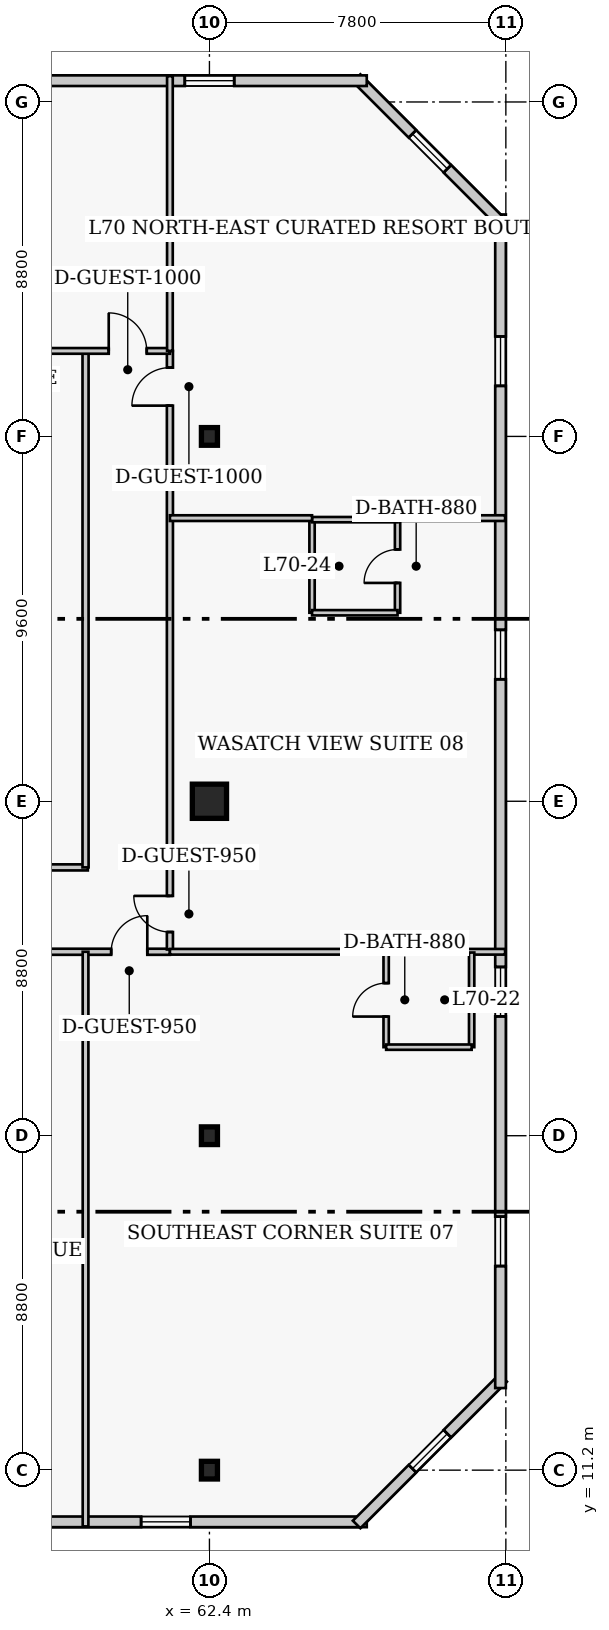
"""IFC4 building model, lengths in metres.
Left out: names, types, materials, properties, quantities, classifications, styles, units other than length and angle.
Written with IfcOpenShell. Run it as: python <this file> out.ifc"""

import sys

from ifc_helpers import new_model, si_unit, direction, frame, frame_2d, origin, origin_2d, place, context, subcontext, project, spatial, rectangle, i_section, extrude, element, fill, save


model = new_model("IFC4")
c1 = context("Model", 3, precision=1e-05, world=origin(), true_north=direction((0.0, 1.0)))
c2 = subcontext(c1, "Body", "Model", "MODEL_VIEW")
j1 = project(units=[si_unit("LENGTHUNIT", "METRE"), si_unit("PLANEANGLEUNIT", "RADIAN")], contexts=[c1])
p1 = place(None, origin())
s1 = spatial("IfcSite", under=j1, at=p1, CompositionType="ELEMENT")
p2 = place(p1, origin())
s2 = spatial("IfcBuilding", under=s1, at=p2, CompositionType="ELEMENT")
p3 = place(p2, frame((0.0, 0.0, 281.4)))
s3 = spatial("IfcBuildingStorey", under=s2, at=p3, CompositionType="ELEMENT", Elevation=281.4)
for number, where, z_axis, x_axis in (
    (1, (62.4, 11.2, 0.0), (0.0, 0.0, 1.0), (1.0, 0.0, 0.0)),
    (2, (62.4, 20.0, 0.0), (0.0, 0.0, 1.0), (1.0, 0.0, 0.0)),
):
    element("IfcColumn", number, at=place(p3, frame(where, z_axis=z_axis, x_axis=x_axis)), inside=s3, PredefinedType="COLUMN", context=c2, shape_type="SweptSolid", body=[
        extrude(i_section(OverallWidth=0.422, OverallDepth=0.465, WebThickness=0.045, FlangeThickness=0.073, FilletRadius=0.017, at=origin_2d()), origin(), (0.0, 0.0, 1.0), 4.0),
    ])
p4 = place(p3, frame((62.4, 28.8, 0.0), z_axis=(0.0, 0.0, 1.0), x_axis=(1.0, 0.0, 0.0)))
e3 = element("IfcColumn", 3, at=p4, inside=s3, PredefinedType="COLUMN", context=c2, shape_type="SweptSolid", body=[
    extrude(rectangle(XDim=0.9, YDim=0.9, at=origin_2d()), origin(), (0.0, 0.0, 1.0), 4.0),
])
p5 = place(p3, frame((62.4, 38.4, 0.0), z_axis=(0.0, 0.0, 1.0), x_axis=(1.0, 0.0, 0.0)))
e4 = element("IfcColumn", 4, at=p5, inside=s3, PredefinedType="COLUMN", context=c2, shape_type="SweptSolid", body=[
    extrude(i_section(OverallWidth=0.422, OverallDepth=0.465, WebThickness=0.045, FlangeThickness=0.073, FilletRadius=0.017, at=origin_2d()), origin(), (0.0, 0.0, 1.0), 4.0),
])
p6 = place(p3, frame((41.71, 9.84, 0.0), z_axis=(0.0, 0.0, 1.0), x_axis=(1.0, 0.0, 0.0)))
e5 = element("IfcWall", 5, at=p6, inside=s3, PredefinedType="SOLIDWALL", context=c2, shape_type="SweptSolid", body=[
    extrude(rectangle(XDim=24.83, YDim=0.28, at=frame_2d((12.415, 0.0))), origin(), (0.0, 0.0, 1.0), 3.76),
])
p7 = place(p6, frame((2.838, 0.0, 0.85)))
e6 = element("IfcOpeningElement", 6, at=p7, cuts=e5, PredefinedType="OPENING", context=c2, shape_type="SweptSolid", body=[
    extrude(rectangle(XDim=1.3, YDim=1.7, at=frame_2d((0.65, 0.85))), frame((0.0, 0.15, 0.0), z_axis=(0.0, -1.0, 0.0), x_axis=(1.0, 0.0, 0.0)), (0.0, 0.0, 1.0), 0.3),
])
p8 = place(p6, frame((11.115, 0.0, 0.85)))
e7 = element("IfcOpeningElement", 7, at=p8, cuts=e5, PredefinedType="OPENING", context=c2, shape_type="SweptSolid", body=[
    extrude(rectangle(XDim=1.3, YDim=1.7, at=frame_2d((0.65, 0.85))), frame((0.0, 0.15, 0.0), z_axis=(0.0, -1.0, 0.0), x_axis=(1.0, 0.0, 0.0)), (0.0, 0.0, 1.0), 0.3),
])
p9 = place(p6, frame((18.892, 0.0, 0.85)))
e8 = element("IfcOpeningElement", 8, at=p9, cuts=e5, PredefinedType="OPENING", context=c2, shape_type="SweptSolid", body=[
    extrude(rectangle(XDim=1.3, YDim=1.7, at=frame_2d((0.65, 0.85))), frame((0.0, 0.15, 0.0), z_axis=(0.0, -1.0, 0.0), x_axis=(1.0, 0.0, 0.0)), (0.0, 0.0, 1.0), 0.3),
])
p10 = place(p3, frame((66.273, 9.771, 0.0), z_axis=(0.0, 0.0, 1.0), x_axis=(0.707129162587, 0.707084399077, 0.0)))
e9 = element("IfcWall", 9, at=p10, inside=s3, PredefinedType="SOLIDWALL", context=c2, shape_type="SweptSolid", body=[
    extrude(rectangle(XDim=5.454, YDim=0.28, at=frame_2d((2.727, 0.0))), origin(), (0.0, 0.0, 1.0), 3.76),
])
p11 = place(p10, frame((2.077, 0.0, 0.85)))
e10 = element("IfcOpeningElement", 10, at=p11, cuts=e9, PredefinedType="OPENING", context=c2, shape_type="SweptSolid", body=[
    extrude(rectangle(XDim=1.3, YDim=1.7, at=frame_2d((0.65, 0.85))), frame((0.0, 0.15, 0.0), z_axis=(0.0, -1.0, 0.0), x_axis=(1.0, 0.0, 0.0)), (0.0, 0.0, 1.0), 0.3),
])
p12 = place(p3, frame((70.06, 13.36, 0.0), z_axis=(0.0, 0.0, 1.0), x_axis=(0.0, 1.0, 0.0)))
e11 = element("IfcWall", 11, at=p12, inside=s3, PredefinedType="SOLIDWALL", context=c2, shape_type="SweptSolid", body=[
    extrude(rectangle(XDim=30.88, YDim=0.28, at=frame_2d((15.44, 0.0))), origin(), (0.0, 0.0, 1.0), 3.76),
])
p13 = place(p12, frame((3.21, 0.0, 0.85)))
e12 = element("IfcOpeningElement", 12, at=p13, cuts=e11, PredefinedType="OPENING", context=c2, shape_type="SweptSolid", body=[
    extrude(rectangle(XDim=1.3, YDim=1.7, at=frame_2d((0.65, 0.85))), frame((0.0, 0.15, 0.0), z_axis=(0.0, -1.0, 0.0), x_axis=(1.0, 0.0, 0.0)), (0.0, 0.0, 1.0), 0.3),
])
p14 = place(p12, frame((9.78, 0.0, 0.85)))
e13 = element("IfcOpeningElement", 13, at=p14, cuts=e11, PredefinedType="OPENING", context=c2, shape_type="SweptSolid", body=[
    extrude(rectangle(XDim=1.3, YDim=1.7, at=frame_2d((0.65, 0.85))), frame((0.0, 0.15, 0.0), z_axis=(0.0, -1.0, 0.0), x_axis=(1.0, 0.0, 0.0)), (0.0, 0.0, 1.0), 0.3),
])
p15 = place(p12, frame((18.65, 0.0, 0.85)))
e14 = element("IfcOpeningElement", 14, at=p15, cuts=e11, PredefinedType="OPENING", context=c2, shape_type="SweptSolid", body=[
    extrude(rectangle(XDim=1.3, YDim=1.7, at=frame_2d((0.65, 0.85))), frame((0.0, 0.15, 0.0), z_axis=(0.0, -1.0, 0.0), x_axis=(1.0, 0.0, 0.0)), (0.0, 0.0, 1.0), 0.3),
])
p16 = place(p12, frame((26.37, 0.0, 0.85)))
e15 = element("IfcOpeningElement", 15, at=p16, cuts=e11, PredefinedType="OPENING", context=c2, shape_type="SweptSolid", body=[
    extrude(rectangle(XDim=1.3, YDim=1.7, at=frame_2d((0.65, 0.85))), frame((0.0, 0.15, 0.0), z_axis=(0.0, -1.0, 0.0), x_axis=(1.0, 0.0, 0.0)), (0.0, 0.0, 1.0), 0.3),
])
p17 = place(p3, frame((70.129, 43.973, 0.0), z_axis=(0.0, 0.0, 1.0), x_axis=(-0.707106781187, 0.707106781187, 0.0)))
e16 = element("IfcWall", 16, at=p17, inside=s3, PredefinedType="SOLIDWALL", context=c2, shape_type="SweptSolid", body=[
    extrude(rectangle(XDim=5.454, YDim=0.28, at=frame_2d((2.727, 0.0))), origin(), (0.0, 0.0, 1.0), 3.76),
])
p18 = place(p17, frame((2.077, 0.0, 0.85)))
e17 = element("IfcOpeningElement", 17, at=p18, cuts=e16, PredefinedType="OPENING", context=c2, shape_type="SweptSolid", body=[
    extrude(rectangle(XDim=1.3, YDim=1.7, at=frame_2d((0.65, 0.85))), frame((0.0, 0.15, 0.0), z_axis=(0.0, -1.0, 0.0), x_axis=(1.0, 0.0, 0.0)), (0.0, 0.0, 1.0), 0.3),
])
p19 = place(p3, frame((66.54, 47.76, 0.0), z_axis=(0.0, 0.0, 1.0), x_axis=(-1.0, 0.0, 0.0)))
e18 = element("IfcWall", 18, at=p19, inside=s3, PredefinedType="SOLIDWALL", context=c2, shape_type="SweptSolid", body=[
    extrude(rectangle(XDim=24.83, YDim=0.28, at=frame_2d((12.415, 0.0))), origin(), (0.0, 0.0, 1.0), 3.76),
])
p20 = place(p19, frame((3.488, 0.0, 0.85)))
e19 = element("IfcOpeningElement", 19, at=p20, cuts=e18, PredefinedType="OPENING", context=c2, shape_type="SweptSolid", body=[
    extrude(rectangle(XDim=1.3, YDim=1.7, at=frame_2d((0.65, 0.85))), frame((0.0, 0.15, 0.0), z_axis=(0.0, -1.0, 0.0), x_axis=(1.0, 0.0, 0.0)), (0.0, 0.0, 1.0), 0.3),
])
p21 = place(p19, frame((12.915, 0.0, 0.85)))
e20 = element("IfcOpeningElement", 20, at=p21, cuts=e18, PredefinedType="OPENING", context=c2, shape_type="SweptSolid", body=[
    extrude(rectangle(XDim=1.3, YDim=1.7, at=frame_2d((0.65, 0.85))), frame((0.0, 0.15, 0.0), z_axis=(0.0, -1.0, 0.0), x_axis=(1.0, 0.0, 0.0)), (0.0, 0.0, 1.0), 0.3),
])
p22 = place(p19, frame((20.692, 0.0, 0.85)))
e21 = element("IfcOpeningElement", 21, at=p22, cuts=e18, PredefinedType="OPENING", context=c2, shape_type="SweptSolid", body=[
    extrude(rectangle(XDim=1.3, YDim=1.7, at=frame_2d((0.65, 0.85))), frame((0.0, 0.15, 0.0), z_axis=(0.0, -1.0, 0.0), x_axis=(1.0, 0.0, 0.0)), (0.0, 0.0, 1.0), 0.3),
])
p23 = place(p3, frame((35.85, 27.06, 0.0), z_axis=(0.0, 0.0, 1.0), x_axis=(1.0, 0.0, 0.0)))
e22 = element("IfcWall", 22, at=p23, inside=s3, PredefinedType="PARTITIONING", context=c2, shape_type="SweptSolid", body=[
    extrude(rectangle(XDim=23.35, YDim=0.16, at=frame_2d((11.675, 0.0))), origin(), (0.0, 0.0, 1.0), 3.76),
])
p24 = place(p23, frame((6.15, 0.0, 0.0)))
e23 = element("IfcOpeningElement", 23, at=p24, cuts=e22, PredefinedType="OPENING", context=c2, shape_type="SweptSolid", body=[
    extrude(rectangle(XDim=1.0, YDim=2.15, at=frame_2d((0.5, 1.075))), frame((0.0, 0.09, 0.0), z_axis=(0.0, -1.0, 0.0), x_axis=(1.0, 0.0, 0.0)), (0.0, 0.0, 1.0), 0.18),
])
p25 = place(p23, frame((13.65, 0.0, 0.0)))
e24 = element("IfcOpeningElement", 24, at=p25, cuts=e22, PredefinedType="OPENING", context=c2, shape_type="SweptSolid", body=[
    extrude(rectangle(XDim=1.0, YDim=2.15, at=frame_2d((0.5, 1.075))), frame((0.0, 0.09, 0.0), z_axis=(0.0, -1.0, 0.0), x_axis=(1.0, 0.0, 0.0)), (0.0, 0.0, 1.0), 0.18),
])
p26 = place(p3, frame((35.8, 24.84, 0.0), z_axis=(0.0, 0.0, 1.0), x_axis=(1.0, 0.0, 0.0)))
e25 = element("IfcWall", 25, at=p26, inside=s3, PredefinedType="PARTITIONING", context=c2, shape_type="SweptSolid", body=[
    extrude(rectangle(XDim=25.56, YDim=0.16, at=frame_2d((12.78, 0.0))), origin(), (0.0, 0.0, 1.0), 3.76),
])
p27 = place(p26, frame((4.185, 0.0, 0.0)))
e26 = element("IfcOpeningElement", 26, at=p27, cuts=e25, PredefinedType="OPENING", context=c2, shape_type="SweptSolid", body=[
    extrude(rectangle(XDim=0.95, YDim=2.1, at=frame_2d((0.475, 1.05))), frame((0.0, 0.09, 0.0), z_axis=(0.0, -1.0, 0.0), x_axis=(1.0, 0.0, 0.0)), (0.0, 0.0, 1.0), 0.18),
])
p28 = place(p26, frame((17.28, 0.0, 0.0)))
e27 = element("IfcOpeningElement", 27, at=p28, cuts=e25, PredefinedType="OPENING", context=c2, shape_type="SweptSolid", body=[
    extrude(rectangle(XDim=1.0, YDim=2.15, at=frame_2d((0.5, 1.075))), frame((0.0, 0.09, 0.0), z_axis=(0.0, -1.0, 0.0), x_axis=(1.0, 0.0, 0.0)), (0.0, 0.0, 1.0), 0.18),
])
p29 = place(p26, frame((24.015, 0.0, 0.0)))
e28 = element("IfcOpeningElement", 28, at=p29, cuts=e25, PredefinedType="OPENING", context=c2, shape_type="SweptSolid", body=[
    extrude(rectangle(XDim=0.95, YDim=2.1, at=frame_2d((0.475, 1.05))), frame((0.0, 0.09, 0.0), z_axis=(0.0, -1.0, 0.0), x_axis=(1.0, 0.0, 0.0)), (0.0, 0.0, 1.0), 0.18),
])
p30 = place(p3, frame((61.36, 24.9, 0.0), z_axis=(0.0, 0.0, 1.0), x_axis=(0.0, 1.0, 0.0)))
e29 = element("IfcWall", 29, at=p30, inside=s3, PredefinedType="PARTITIONING", context=c2, shape_type="SweptSolid", body=[
    extrude(rectangle(XDim=15.75, YDim=0.16, at=frame_2d((7.875, 0.0))), origin(), (0.0, 0.0, 1.0), 3.76),
])
p31 = place(p30, frame((0.46, 0.0, 0.0)))
e30 = element("IfcOpeningElement", 30, at=p31, cuts=e29, PredefinedType="OPENING", context=c2, shape_type="SweptSolid", body=[
    extrude(rectangle(XDim=0.95, YDim=2.1, at=frame_2d((0.475, 1.05))), frame((0.0, 0.09, 0.0), z_axis=(0.0, -1.0, 0.0), x_axis=(1.0, 0.0, 0.0)), (0.0, 0.0, 1.0), 0.18),
])
p32 = place(p30, frame((14.31, 0.0, 0.0)))
e31 = element("IfcOpeningElement", 31, at=p32, cuts=e29, PredefinedType="OPENING", context=c2, shape_type="SweptSolid", body=[
    extrude(rectangle(XDim=1.0, YDim=2.15, at=frame_2d((0.5, 1.075))), frame((0.0, 0.09, 0.0), z_axis=(0.0, -1.0, 0.0), x_axis=(1.0, 0.0, 0.0)), (0.0, 0.0, 1.0), 0.18),
])
p33 = place(p3, frame((59.14, 27.06, 0.0), z_axis=(0.0, 0.0, 1.0), x_axis=(0.0, 1.0, 0.0)))
e32 = element("IfcWall", 32, at=p33, inside=s3, PredefinedType="PARTITIONING", context=c2, shape_type="SweptSolid", body=[
    extrude(rectangle(XDim=13.59, YDim=0.16, at=frame_2d((6.795, 0.0))), origin(), (0.0, 0.0, 1.0), 3.76),
])
p34 = place(p3, frame((56.8, 40.65, 0.0), z_axis=(0.0, 0.0, 1.0), x_axis=(1.0, 0.0, 0.0)))
e33 = element("IfcWall", 33, at=p34, inside=s3, PredefinedType="PARTITIONING", context=c2, shape_type="SweptSolid", body=[
    extrude(rectangle(XDim=4.56, YDim=0.15, at=frame_2d((2.28, 0.0))), origin(), (0.0, 0.0, 1.0), 3.76),
])
p35 = place(p34, frame((2.95, 0.0, 0.0)))
e34 = element("IfcOpeningElement", 34, at=p35, cuts=e33, PredefinedType="OPENING", context=c2, shape_type="SweptSolid", body=[
    extrude(rectangle(XDim=1.0, YDim=2.15, at=frame_2d((0.5, 1.075))), frame((0.0, 0.085, 0.0), z_axis=(0.0, -1.0, 0.0), x_axis=(1.0, 0.0, 0.0)), (0.0, 0.0, 1.0), 0.17),
])
p36 = place(p3, frame((61.36, 40.65, 0.0), z_axis=(0.0, 0.0, 1.0), x_axis=(0.0, 1.0, 0.0)))
e35 = element("IfcWall", 35, at=p36, inside=s3, PredefinedType="PARTITIONING", context=c2, shape_type="SweptSolid", body=[
    extrude(rectangle(XDim=7.23, YDim=0.15, at=frame_2d((3.615, 0.0))), origin(), (0.0, 0.0, 1.0), 3.76),
])
p37 = place(p3, frame((59.14, 9.72, 0.0), z_axis=(0.0, 0.0, 1.0), x_axis=(0.0, 1.0, 0.0)))
e36 = element("IfcWall", 36, at=p37, inside=s3, PredefinedType="PARTITIONING", context=c2, shape_type="SweptSolid", body=[
    extrude(rectangle(XDim=15.12, YDim=0.15, at=frame_2d((7.56, 0.0))), origin(), (0.0, 0.0, 1.0), 3.76),
])
p38 = place(p3, frame((61.36, 24.84, 0.0), z_axis=(0.0, 0.0, 1.0), x_axis=(1.0, 0.0, 0.0)))
e37 = element("IfcWall", 37, at=p38, inside=s3, PredefinedType="PARTITIONING", context=c2, shape_type="SweptSolid", body=[
    extrude(rectangle(XDim=8.82, YDim=0.15, at=frame_2d((4.41, 0.0))), origin(), (0.0, 0.0, 1.0), 3.76),
])
p39 = place(p3, frame((67.05, 22.33, 0.0), z_axis=(0.0, 0.0, 1.0), x_axis=(0.0, 1.0, 0.0)))
e38 = element("IfcWall", 38, at=p39, inside=s3, PredefinedType="PLUMBINGWALL", context=c2, shape_type="SweptSolid", body=[
    extrude(rectangle(XDim=2.49, YDim=0.14, at=frame_2d((1.245, 0.0))), origin(), (0.0, 0.0, 1.0), 3.76),
])
p40 = place(p39, frame((0.805, 0.0, 0.0)))
e39 = element("IfcOpeningElement", 39, at=p40, cuts=e38, PredefinedType="OPENING", context=c2, shape_type="SweptSolid", body=[
    extrude(rectangle(XDim=0.88, YDim=2.05, at=frame_2d((0.44, 1.025))), frame((0.0, 0.08, 0.0), z_axis=(0.0, -1.0, 0.0), x_axis=(1.0, 0.0, 0.0)), (0.0, 0.0, 1.0), 0.16),
])
p41 = place(p3, frame((69.3, 22.33, 0.0), z_axis=(0.0, 0.0, 1.0), x_axis=(0.0, 1.0, 0.0)))
e40 = element("IfcWall", 40, at=p41, inside=s3, PredefinedType="PLUMBINGWALL", context=c2, shape_type="SweptSolid", body=[
    extrude(rectangle(XDim=2.49, YDim=0.14, at=frame_2d((1.245, 0.0))), origin(), (0.0, 0.0, 1.0), 3.76),
])
p42 = place(p3, frame((67.05, 22.33, 0.0), z_axis=(0.0, 0.0, 1.0), x_axis=(1.0, 0.0, 0.0)))
e41 = element("IfcWall", 41, at=p42, inside=s3, PredefinedType="PLUMBINGWALL", context=c2, shape_type="SweptSolid", body=[
    extrude(rectangle(XDim=2.25, YDim=0.14, at=frame_2d((1.125, 0.0))), origin(), (0.0, 0.0, 1.0), 3.76),
])
p43 = place(p3, frame((65.1, 33.76, 0.0), z_axis=(0.0, 0.0, 1.0), x_axis=(0.0, 1.0, 0.0)))
e42 = element("IfcWall", 42, at=p43, inside=s3, PredefinedType="PLUMBINGWALL", context=c2, shape_type="SweptSolid", body=[
    extrude(rectangle(XDim=2.45, YDim=0.14, at=frame_2d((1.225, 0.0))), origin(), (0.0, 0.0, 1.0), 3.76),
])
p44 = place(p3, frame((67.35, 33.76, 0.0), z_axis=(0.0, 0.0, 1.0), x_axis=(0.0, 1.0, 0.0)))
e43 = element("IfcWall", 43, at=p44, inside=s3, PredefinedType="PLUMBINGWALL", context=c2, shape_type="SweptSolid", body=[
    extrude(rectangle(XDim=2.45, YDim=0.14, at=frame_2d((1.225, 0.0))), origin(), (0.0, 0.0, 1.0), 3.76),
])
p45 = place(p44, frame((0.785, 0.0, 0.0)))
e44 = element("IfcOpeningElement", 44, at=p45, cuts=e43, PredefinedType="OPENING", context=c2, shape_type="SweptSolid", body=[
    extrude(rectangle(XDim=0.88, YDim=2.05, at=frame_2d((0.44, 1.025))), frame((0.0, 0.08, 0.0), z_axis=(0.0, -1.0, 0.0), x_axis=(1.0, 0.0, 0.0)), (0.0, 0.0, 1.0), 0.16),
])
for number, where, z_axis, x_axis in (
    (45, (65.1, 33.76, 0.0), (0.0, 0.0, 1.0), (1.0, 0.0, 0.0)),
    (46, (65.1, 36.21, 0.0), (0.0, 0.0, 1.0), (1.0, 0.0, 0.0)),
):
    element("IfcWall", number, at=place(p3, frame(where, z_axis=z_axis, x_axis=x_axis)), inside=s3, PredefinedType="PLUMBINGWALL", context=c2, shape_type="SweptSolid", body=[
        extrude(rectangle(XDim=2.25, YDim=0.14, at=frame_2d((1.125, 0.0))), origin(), (0.0, 0.0, 1.0), 3.76),
    ])
p46 = place(p3, frame((61.36, 36.25, 0.0), z_axis=(0.0, 0.0, 1.0), x_axis=(1.0, 0.0, 0.0)))
e47 = element("IfcWall", 47, at=p46, inside=s3, PredefinedType="PARTITIONING", context=c2, shape_type="SweptSolid", body=[
    extrude(rectangle(XDim=3.74, YDim=0.15, at=frame_2d((1.87, 0.0))), origin(), (0.0, 0.0, 1.0), 3.76),
])
p47 = place(p3, frame((67.35, 36.25, 0.0), z_axis=(0.0, 0.0, 1.0), x_axis=(1.0, 0.0, 0.0)))
e48 = element("IfcWall", 48, at=p47, inside=s3, PredefinedType="PARTITIONING", context=c2, shape_type="SweptSolid", body=[
    extrude(rectangle(XDim=2.83, YDim=0.15, at=frame_2d((1.415, 0.0))), origin(), (0.0, 0.0, 1.0), 3.76),
])
p48 = place(p9, origin())
e49 = element("IfcWindow", 49, at=p48, inside=s3, PartitioningType="SINGLE_PANEL", PredefinedType="WINDOW", context=c2, shape_type="SweptSolid", body=[
    extrude(rectangle(XDim=1.3, YDim=1.7, at=frame_2d((0.65, 0.85))), frame((0.0, 0.03, 0.0), z_axis=(0.0, -1.0, 0.0), x_axis=(1.0, 0.0, 0.0)), (0.0, 0.0, 1.0), 0.06),
])
fill(e8, e49)
p49 = place(p11, origin())
e50 = element("IfcWindow", 50, at=p49, inside=s3, PartitioningType="SINGLE_PANEL", PredefinedType="WINDOW", context=c2, shape_type="SweptSolid", body=[
    extrude(rectangle(XDim=1.3, YDim=1.7, at=frame_2d((0.65, 0.85))), frame((0.0, 0.03, 0.0), z_axis=(0.0, -1.0, 0.0), x_axis=(1.0, 0.0, 0.0)), (0.0, 0.0, 1.0), 0.06),
])
fill(e10, e50)
p50 = place(p13, origin())
e51 = element("IfcWindow", 51, at=p50, inside=s3, PartitioningType="SINGLE_PANEL", PredefinedType="WINDOW", context=c2, shape_type="SweptSolid", body=[
    extrude(rectangle(XDim=1.3, YDim=1.7, at=frame_2d((0.65, 0.85))), frame((0.0, 0.03, 0.0), z_axis=(0.0, -1.0, 0.0), x_axis=(1.0, 0.0, 0.0)), (0.0, 0.0, 1.0), 0.06),
])
fill(e12, e51)
p51 = place(p14, origin())
e52 = element("IfcWindow", 52, at=p51, inside=s3, PartitioningType="SINGLE_PANEL", PredefinedType="WINDOW", context=c2, shape_type="SweptSolid", body=[
    extrude(rectangle(XDim=1.3, YDim=1.7, at=frame_2d((0.65, 0.85))), frame((0.0, 0.03, 0.0), z_axis=(0.0, -1.0, 0.0), x_axis=(1.0, 0.0, 0.0)), (0.0, 0.0, 1.0), 0.06),
])
fill(e13, e52)
p52 = place(p15, origin())
e53 = element("IfcWindow", 53, at=p52, inside=s3, PartitioningType="SINGLE_PANEL", PredefinedType="WINDOW", context=c2, shape_type="SweptSolid", body=[
    extrude(rectangle(XDim=1.3, YDim=1.7, at=frame_2d((0.65, 0.85))), frame((0.0, 0.03, 0.0), z_axis=(0.0, -1.0, 0.0), x_axis=(1.0, 0.0, 0.0)), (0.0, 0.0, 1.0), 0.06),
])
fill(e14, e53)
p53 = place(p16, origin())
e54 = element("IfcWindow", 54, at=p53, inside=s3, PartitioningType="SINGLE_PANEL", PredefinedType="WINDOW", context=c2, shape_type="SweptSolid", body=[
    extrude(rectangle(XDim=1.3, YDim=1.7, at=frame_2d((0.65, 0.85))), frame((0.0, 0.03, 0.0), z_axis=(0.0, -1.0, 0.0), x_axis=(1.0, 0.0, 0.0)), (0.0, 0.0, 1.0), 0.06),
])
fill(e15, e54)
p54 = place(p18, origin())
e55 = element("IfcWindow", 55, at=p54, inside=s3, PartitioningType="SINGLE_PANEL", PredefinedType="WINDOW", context=c2, shape_type="SweptSolid", body=[
    extrude(rectangle(XDim=1.3, YDim=1.7, at=frame_2d((0.65, 0.85))), frame((0.0, 0.03, 0.0), z_axis=(0.0, -1.0, 0.0), x_axis=(1.0, 0.0, 0.0)), (0.0, 0.0, 1.0), 0.06),
])
fill(e17, e55)
p55 = place(p20, origin())
e56 = element("IfcWindow", 56, at=p55, inside=s3, PartitioningType="SINGLE_PANEL", PredefinedType="WINDOW", context=c2, shape_type="SweptSolid", body=[
    extrude(rectangle(XDim=1.3, YDim=1.7, at=frame_2d((0.65, 0.85))), frame((0.0, 0.03, 0.0), z_axis=(0.0, -1.0, 0.0), x_axis=(1.0, 0.0, 0.0)), (0.0, 0.0, 1.0), 0.06),
])
fill(e19, e56)
p56 = place(p35, origin())
e57 = element("IfcDoor", 57, at=p56, inside=s3, OperationType="SINGLE_SWING_LEFT", PredefinedType="DOOR", context=c2, shape_type="SweptSolid", body=[
    extrude(rectangle(XDim=1.0, YDim=2.15, at=frame_2d((0.5, 1.075))), frame((0.0, 0.025, 0.0), z_axis=(0.0, -1.0, 0.0), x_axis=(1.0, 0.0, 0.0)), (0.0, 0.0, 1.0), 0.05),
])
fill(e34, e57)
p57 = place(p40, origin())
e58 = element("IfcDoor", 58, at=p57, inside=s3, OperationType="SINGLE_SWING_LEFT", PredefinedType="DOOR", context=c2, shape_type="SweptSolid", body=[
    extrude(rectangle(XDim=0.88, YDim=2.05, at=frame_2d((0.44, 1.025))), frame((0.0, 0.025, 0.0), z_axis=(0.0, -1.0, 0.0), x_axis=(1.0, 0.0, 0.0)), (0.0, 0.0, 1.0), 0.05),
])
fill(e39, e58)
p58 = place(p29, origin())
e59 = element("IfcDoor", 59, at=p58, inside=s3, OperationType="SINGLE_SWING_RIGHT", PredefinedType="DOOR", context=c2, shape_type="SweptSolid", body=[
    extrude(rectangle(XDim=0.95, YDim=2.1, at=frame_2d((0.475, 1.05))), frame((0.0, 0.025, 0.0), z_axis=(0.0, -1.0, 0.0), x_axis=(1.0, 0.0, 0.0)), (0.0, 0.0, 1.0), 0.05),
])
fill(e28, e59)
p59 = place(p45, origin())
e60 = element("IfcDoor", 60, at=p59, inside=s3, OperationType="SINGLE_SWING_LEFT", PredefinedType="DOOR", context=c2, shape_type="SweptSolid", body=[
    extrude(rectangle(XDim=0.88, YDim=2.05, at=frame_2d((0.44, 1.025))), frame((0.0, 0.025, 0.0), z_axis=(0.0, -1.0, 0.0), x_axis=(1.0, 0.0, 0.0)), (0.0, 0.0, 1.0), 0.05),
])
fill(e44, e60)
p60 = place(p31, origin())
e61 = element("IfcDoor", 61, at=p60, inside=s3, OperationType="SINGLE_SWING_RIGHT", PredefinedType="DOOR", context=c2, shape_type="SweptSolid", body=[
    extrude(rectangle(XDim=0.95, YDim=2.1, at=frame_2d((0.475, 1.05))), frame((0.0, 0.025, 0.0), z_axis=(0.0, -1.0, 0.0), x_axis=(1.0, 0.0, 0.0)), (0.0, 0.0, 1.0), 0.05),
])
fill(e30, e61)
p61 = place(p32, origin())
e62 = element("IfcDoor", 62, at=p61, inside=s3, OperationType="SINGLE_SWING_LEFT", PredefinedType="DOOR", context=c2, shape_type="SweptSolid", body=[
    extrude(rectangle(XDim=1.0, YDim=2.15, at=frame_2d((0.5, 1.075))), frame((0.0, 0.025, 0.0), z_axis=(0.0, -1.0, 0.0), x_axis=(1.0, 0.0, 0.0)), (0.0, 0.0, 1.0), 0.05),
])
fill(e31, e62)
save(model, sys.argv[1])
